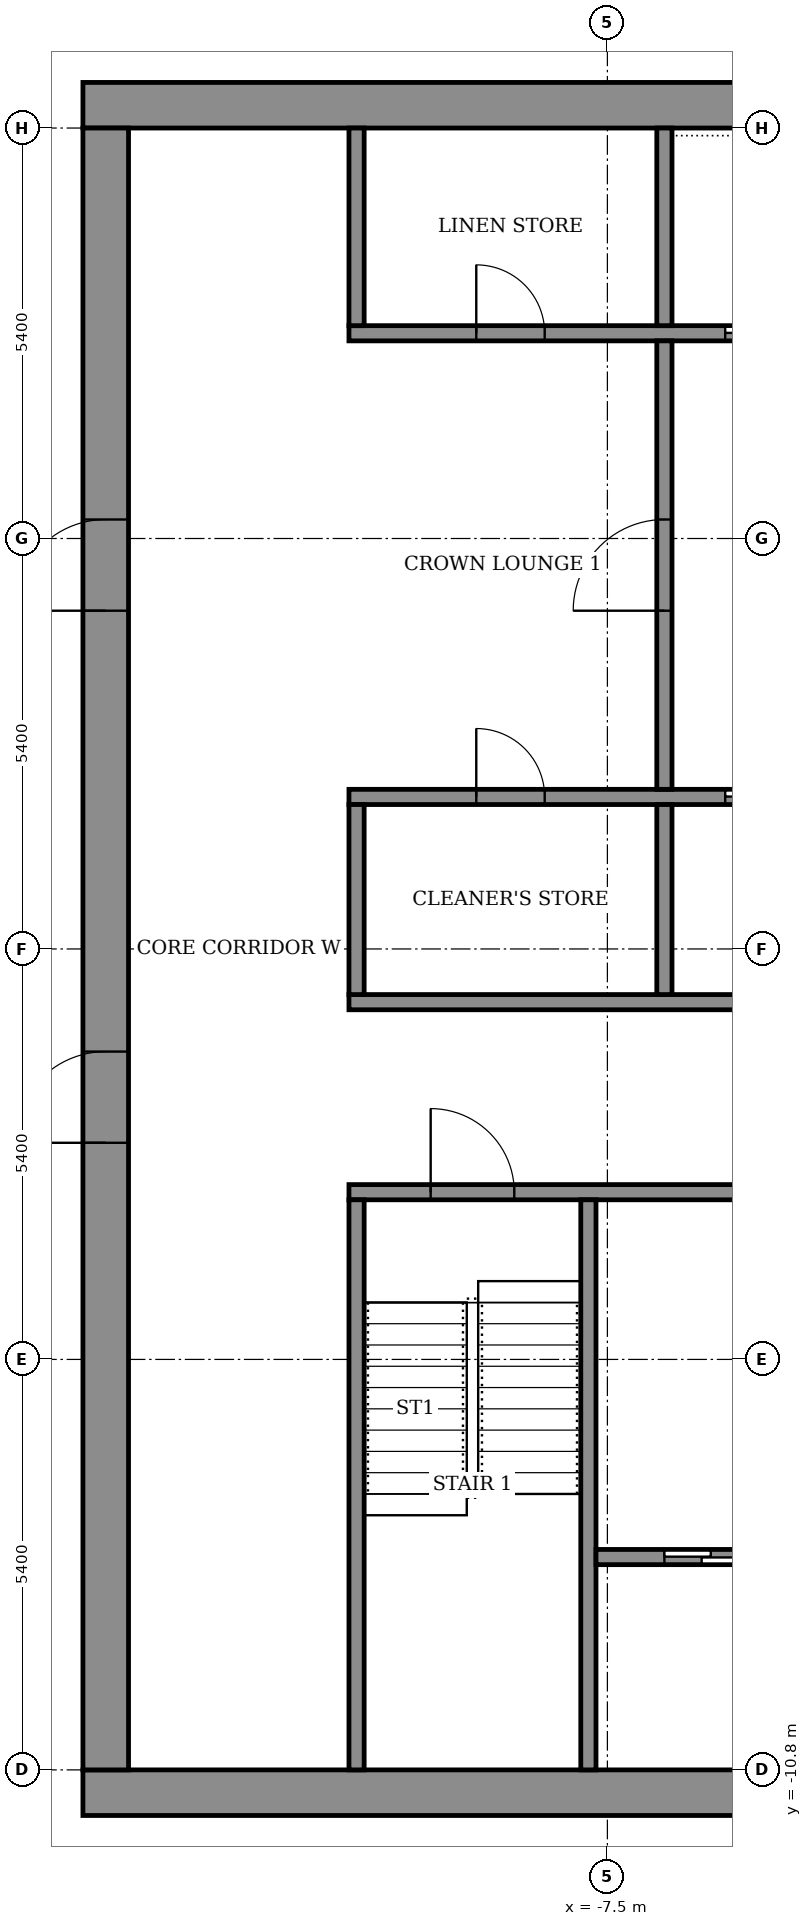
"""IFC4 building model, lengths in metres.
Left out: names, types, materials, properties, quantities, classifications, styles, units other than length and angle.
Written with IfcOpenShell. Run it as: python <this file> out.ifc"""

import sys

from ifc_helpers import new_model, si_unit, direction, frame, frame_2d, origin, place, context, subcontext, project, spatial, rectangle, extrude, element, fill, save


model = new_model("IFC4")
c1 = context("Model", 3, precision=1e-05, world=origin(), true_north=direction((0.0, 1.0)))
c2 = subcontext(c1, "Body", "Model", "MODEL_VIEW")
j1 = project(units=[si_unit("LENGTHUNIT", "METRE"), si_unit("PLANEANGLEUNIT", "RADIAN")], contexts=[c1])
p1 = place(None, origin())
s1 = spatial("IfcSite", under=j1, at=p1, CompositionType="ELEMENT")
p2 = place(p1, origin())
s2 = spatial("IfcBuilding", under=s1, at=p2, CompositionType="ELEMENT")
p3 = place(p2, frame((0.0, 0.0, 350.7)))
s3 = spatial("IfcBuildingStorey", under=s2, at=p3, CompositionType="ELEMENT", Elevation=350.7)
for number, where, z_axis, x_axis in (
    (1, (-14.4, -11.1, 0.0), (0.0, 0.0, 1.0), (1.0, 0.0, 0.0)),
    (2, (-14.4, 11.1, 0.0), (0.0, 0.0, 1.0), (1.0, 0.0, 0.0)),
):
    element("IfcWall", number, at=place(p3, frame(where, z_axis=z_axis, x_axis=x_axis)), inside=s3, PredefinedType="SHEAR", context=c2, shape_type="SweptSolid", body=[
        extrude(rectangle(XDim=28.8, YDim=0.6, at=frame_2d((14.4, 0.0))), origin(), (0.0, 0.0, 1.0), 3.6),
    ])
p4 = place(p3, frame((-14.1, -10.8, 0.0), z_axis=(0.0, 0.0, 1.0), x_axis=(0.0, 1.0, 0.0)))
e3 = element("IfcWall", 3, at=p4, inside=s3, PredefinedType="SHEAR", context=c2, shape_type="SweptSolid", body=[
    extrude(rectangle(XDim=21.6, YDim=0.6, at=frame_2d((10.8, 0.0))), origin(), (0.0, 0.0, 1.0), 3.6),
])
p5 = place(p4, frame((8.25, 0.0, 0.0)))
e4 = element("IfcOpeningElement", 4, at=p5, cuts=e3, PredefinedType="OPENING", context=c2, shape_type="SweptSolid", body=[
    extrude(rectangle(XDim=1.2, YDim=2.1, at=frame_2d((0.6, 1.05))), frame((0.0, 0.31, 0.0), z_axis=(0.0, -1.0, 0.0), x_axis=(1.0, 0.0, 0.0)), (0.0, 0.0, 1.0), 0.62),
])
p6 = place(p4, frame((15.25, 0.0, 0.0)))
e5 = element("IfcOpeningElement", 5, at=p6, cuts=e3, PredefinedType="OPENING", context=c2, shape_type="SweptSolid", body=[
    extrude(rectangle(XDim=1.2, YDim=2.1, at=frame_2d((0.6, 1.05))), frame((0.0, 0.31, 0.0), z_axis=(0.0, -1.0, 0.0), x_axis=(1.0, 0.0, 0.0)), (0.0, 0.0, 1.0), 0.62),
])
p7 = place(p3, frame((-10.9, -3.2, 0.0), z_axis=(0.0, 0.0, 1.0), x_axis=(1.0, 0.0, 0.0)))
e6 = element("IfcWall", 6, at=p7, inside=s3, PredefinedType="SHEAR", context=c2, shape_type="SweptSolid", body=[
    extrude(rectangle(XDim=21.8, YDim=0.2, at=frame_2d((10.9, 0.0))), origin(), (0.0, 0.0, 1.0), 3.05),
])
p8 = place(p7, frame((1.075, 0.0, 0.0)))
e7 = element("IfcOpeningElement", 7, at=p8, cuts=e6, PredefinedType="OPENING", context=c2, shape_type="SweptSolid", body=[
    extrude(rectangle(XDim=1.1, YDim=2.1, at=frame_2d((0.55, 1.05))), frame((0.0, 0.11, 0.0), z_axis=(0.0, -1.0, 0.0), x_axis=(1.0, 0.0, 0.0)), (0.0, 0.0, 1.0), 0.22),
])
p9 = place(p7, frame((10.325, 0.0, 0.0)))
e8 = element("IfcOpeningElement", 8, at=p9, cuts=e6, PredefinedType="OPENING", context=c2, shape_type="SweptSolid", body=[
    extrude(rectangle(XDim=1.1, YDim=2.1, at=frame_2d((0.55, 1.05))), frame((0.0, 0.11, 0.0), z_axis=(0.0, -1.0, 0.0), x_axis=(1.0, 0.0, 0.0)), (0.0, 0.0, 1.0), 0.22),
])
p10 = place(p7, frame((19.625, 0.0, 0.0)))
e9 = element("IfcOpeningElement", 9, at=p10, cuts=e6, PredefinedType="OPENING", context=c2, shape_type="SweptSolid", body=[
    extrude(rectangle(XDim=1.1, YDim=2.1, at=frame_2d((0.55, 1.05))), frame((0.0, 0.11, 0.0), z_axis=(0.0, -1.0, 0.0), x_axis=(1.0, 0.0, 0.0)), (0.0, 0.0, 1.0), 0.22),
])
p11 = place(p7, frame((5.7, 0.0, 0.0)))
e10 = element("IfcOpeningElement", 10, at=p11, cuts=e6, PredefinedType="OPENING", context=c2, shape_type="SweptSolid", body=[
    extrude(rectangle(XDim=1.1, YDim=2.1, at=frame_2d((0.55, 1.05))), frame((0.0, 0.11, 0.0), z_axis=(0.0, -1.0, 0.0), x_axis=(1.0, 0.0, 0.0)), (0.0, 0.0, 1.0), 0.22),
])
p12 = place(p7, frame((14.975, 0.0, 0.0)))
e11 = element("IfcOpeningElement", 11, at=p12, cuts=e6, PredefinedType="OPENING", context=c2, shape_type="SweptSolid", body=[
    extrude(rectangle(XDim=1.1, YDim=2.1, at=frame_2d((0.55, 1.05))), frame((0.0, 0.11, 0.0), z_axis=(0.0, -1.0, 0.0), x_axis=(1.0, 0.0, 0.0)), (0.0, 0.0, 1.0), 0.22),
])
p13 = place(p3, frame((-10.9, -0.7, 0.0), z_axis=(0.0, 0.0, 1.0), x_axis=(1.0, 0.0, 0.0)))
e12 = element("IfcWall", 12, at=p13, inside=s3, PredefinedType="SHEAR", context=c2, shape_type="SweptSolid", body=[
    extrude(rectangle(XDim=21.8, YDim=0.2, at=frame_2d((10.9, 0.0))), origin(), (0.0, 0.0, 1.0), 3.05),
])
p14 = place(p3, frame((-10.9, 2.0, 0.0), z_axis=(0.0, 0.0, 1.0), x_axis=(1.0, 0.0, 0.0)))
e13 = element("IfcWall", 13, at=p14, inside=s3, PredefinedType="SHEAR", context=c2, shape_type="SweptSolid", body=[
    extrude(rectangle(XDim=21.8, YDim=0.2, at=frame_2d((10.9, 0.0))), origin(), (0.0, 0.0, 1.0), 3.05),
])
p15 = place(p14, frame((4.95, 0.0, 0.0)))
e14 = element("IfcOpeningElement", 14, at=p15, cuts=e13, PredefinedType="OPENING", context=c2, shape_type="SweptSolid", body=[
    extrude(rectangle(XDim=1.1, YDim=2.1, at=frame_2d((0.55, 1.05))), frame((0.0, 0.11, 0.0), z_axis=(0.0, -1.0, 0.0), x_axis=(1.0, 0.0, 0.0)), (0.0, 0.0, 1.0), 0.22),
])
p16 = place(p14, frame((7.65, 0.0, 0.0)))
e15 = element("IfcOpeningElement", 15, at=p16, cuts=e13, PredefinedType="OPENING", context=c2, shape_type="SweptSolid", body=[
    extrude(rectangle(XDim=1.1, YDim=2.1, at=frame_2d((0.55, 1.05))), frame((0.0, 0.11, 0.0), z_axis=(0.0, -1.0, 0.0), x_axis=(1.0, 0.0, 0.0)), (0.0, 0.0, 1.0), 0.22),
])
p17 = place(p14, frame((10.35, 0.0, 0.0)))
e16 = element("IfcOpeningElement", 16, at=p17, cuts=e13, PredefinedType="OPENING", context=c2, shape_type="SweptSolid", body=[
    extrude(rectangle(XDim=1.1, YDim=2.1, at=frame_2d((0.55, 1.05))), frame((0.0, 0.11, 0.0), z_axis=(0.0, -1.0, 0.0), x_axis=(1.0, 0.0, 0.0)), (0.0, 0.0, 1.0), 0.22),
])
p18 = place(p14, frame((1.675, 0.0, 0.0)))
e17 = element("IfcOpeningElement", 17, at=p18, cuts=e13, PredefinedType="OPENING", context=c2, shape_type="SweptSolid", body=[
    extrude(rectangle(XDim=0.9, YDim=2.1, at=frame_2d((0.45, 1.05))), frame((0.0, 0.11, 0.0), z_axis=(0.0, -1.0, 0.0), x_axis=(1.0, 0.0, 0.0)), (0.0, 0.0, 1.0), 0.22),
])
p19 = place(p14, frame((14.5, 0.0, 0.0)))
e18 = element("IfcOpeningElement", 18, at=p19, cuts=e13, PredefinedType="OPENING", context=c2, shape_type="SweptSolid", body=[
    extrude(rectangle(XDim=0.9, YDim=2.1, at=frame_2d((0.45, 1.05))), frame((0.0, 0.11, 0.0), z_axis=(0.0, -1.0, 0.0), x_axis=(1.0, 0.0, 0.0)), (0.0, 0.0, 1.0), 0.22),
])
p20 = place(p14, frame((19.225, 0.0, 0.0)))
e19 = element("IfcOpeningElement", 19, at=p20, cuts=e13, PredefinedType="OPENING", context=c2, shape_type="SweptSolid", body=[
    extrude(rectangle(XDim=0.9, YDim=2.1, at=frame_2d((0.45, 1.05))), frame((0.0, 0.11, 0.0), z_axis=(0.0, -1.0, 0.0), x_axis=(1.0, 0.0, 0.0)), (0.0, 0.0, 1.0), 0.22),
])
p21 = place(p3, frame((-10.9, 8.1, 0.0), z_axis=(0.0, 0.0, 1.0), x_axis=(1.0, 0.0, 0.0)))
e20 = element("IfcWall", 20, at=p21, inside=s3, PredefinedType="SHEAR", context=c2, shape_type="SweptSolid", body=[
    extrude(rectangle(XDim=21.8, YDim=0.2, at=frame_2d((10.9, 0.0))), origin(), (0.0, 0.0, 1.0), 3.05),
])
p22 = place(p21, frame((4.95, 0.0, 0.0)))
e21 = element("IfcOpeningElement", 21, at=p22, cuts=e20, PredefinedType="OPENING", context=c2, shape_type="SweptSolid", body=[
    extrude(rectangle(XDim=1.1, YDim=2.1, at=frame_2d((0.55, 1.05))), frame((0.0, 0.11, 0.0), z_axis=(0.0, -1.0, 0.0), x_axis=(1.0, 0.0, 0.0)), (0.0, 0.0, 1.0), 0.22),
])
p23 = place(p21, frame((7.65, 0.0, 0.0)))
e22 = element("IfcOpeningElement", 22, at=p23, cuts=e20, PredefinedType="OPENING", context=c2, shape_type="SweptSolid", body=[
    extrude(rectangle(XDim=1.1, YDim=2.1, at=frame_2d((0.55, 1.05))), frame((0.0, 0.11, 0.0), z_axis=(0.0, -1.0, 0.0), x_axis=(1.0, 0.0, 0.0)), (0.0, 0.0, 1.0), 0.22),
])
p24 = place(p21, frame((10.35, 0.0, 0.0)))
e23 = element("IfcOpeningElement", 23, at=p24, cuts=e20, PredefinedType="OPENING", context=c2, shape_type="SweptSolid", body=[
    extrude(rectangle(XDim=1.1, YDim=2.1, at=frame_2d((0.55, 1.05))), frame((0.0, 0.11, 0.0), z_axis=(0.0, -1.0, 0.0), x_axis=(1.0, 0.0, 0.0)), (0.0, 0.0, 1.0), 0.22),
])
p25 = place(p21, frame((1.675, 0.0, 0.0)))
e24 = element("IfcOpeningElement", 24, at=p25, cuts=e20, PredefinedType="OPENING", context=c2, shape_type="SweptSolid", body=[
    extrude(rectangle(XDim=0.9, YDim=2.1, at=frame_2d((0.45, 1.05))), frame((0.0, 0.11, 0.0), z_axis=(0.0, -1.0, 0.0), x_axis=(1.0, 0.0, 0.0)), (0.0, 0.0, 1.0), 0.22),
])
p26 = place(p21, frame((14.5, 0.0, 0.0)))
e25 = element("IfcOpeningElement", 25, at=p26, cuts=e20, PredefinedType="OPENING", context=c2, shape_type="SweptSolid", body=[
    extrude(rectangle(XDim=0.9, YDim=2.1, at=frame_2d((0.45, 1.05))), frame((0.0, 0.11, 0.0), z_axis=(0.0, -1.0, 0.0), x_axis=(1.0, 0.0, 0.0)), (0.0, 0.0, 1.0), 0.22),
])
p27 = place(p21, frame((19.225, 0.0, 0.0)))
e26 = element("IfcOpeningElement", 26, at=p27, cuts=e20, PredefinedType="OPENING", context=c2, shape_type="SweptSolid", body=[
    extrude(rectangle(XDim=0.9, YDim=2.1, at=frame_2d((0.45, 1.05))), frame((0.0, 0.11, 0.0), z_axis=(0.0, -1.0, 0.0), x_axis=(1.0, 0.0, 0.0)), (0.0, 0.0, 1.0), 0.22),
])
for number, where, z_axis, x_axis in (
    (27, (-10.8, -10.8, 0.0), (0.0, 0.0, 1.0), (0.0, 1.0, 0.0)),
    (28, (-7.75, -10.8, 0.0), (0.0, 0.0, 1.0), (0.0, 1.0, 0.0)),
):
    element("IfcWall", number, at=place(p3, frame(where, z_axis=z_axis, x_axis=x_axis)), inside=s3, PredefinedType="SHEAR", context=c2, shape_type="SweptSolid", body=[
        extrude(rectangle(XDim=7.5, YDim=0.2, at=frame_2d((3.75, 0.0))), origin(), (0.0, 0.0, 1.0), 3.05),
    ])
p28 = place(p3, frame((-7.65, -8.0, 0.0), z_axis=(0.0, 0.0, 1.0), x_axis=(1.0, 0.0, 0.0)))
e29 = element("IfcWall", 29, at=p28, inside=s3, PredefinedType="SHEAR", context=c2, shape_type="SweptSolid", body=[
    extrude(rectangle(XDim=6.0, YDim=0.2, at=frame_2d((3.0, 0.0))), origin(), (0.0, 0.0, 1.0), 3.05),
])
p29 = place(p28, frame((0.9, 0.0, 0.0)))
e30 = element("IfcOpeningElement", 30, at=p29, cuts=e29, PredefinedType="OPENING", context=c2, shape_type="SweptSolid", body=[
    extrude(rectangle(XDim=1.1, YDim=2.1, at=frame_2d((0.55, 1.05))), frame((0.0, 0.11, 0.0), z_axis=(0.0, -1.0, 0.0), x_axis=(1.0, 0.0, 0.0)), (0.0, 0.0, 1.0), 0.22),
])
p30 = place(p28, frame((4.0, 0.0, 0.0)))
e31 = element("IfcOpeningElement", 31, at=p30, cuts=e29, PredefinedType="OPENING", context=c2, shape_type="SweptSolid", body=[
    extrude(rectangle(XDim=1.1, YDim=2.1, at=frame_2d((0.55, 1.05))), frame((0.0, 0.11, 0.0), z_axis=(0.0, -1.0, 0.0), x_axis=(1.0, 0.0, 0.0)), (0.0, 0.0, 1.0), 0.22),
])
p31 = place(p3, frame((-10.8, -0.6, 0.0), z_axis=(0.0, 0.0, 1.0), x_axis=(0.0, 1.0, 0.0)))
e32 = element("IfcWall", 32, at=p31, inside=s3, PredefinedType="STANDARD", context=c2, shape_type="SweptSolid", body=[
    extrude(rectangle(XDim=2.5, YDim=0.2, at=frame_2d((1.25, 0.0))), origin(), (0.0, 0.0, 1.0), 3.05),
])
p32 = place(p3, frame((-6.75, -0.6, 0.0), z_axis=(0.0, 0.0, 1.0), x_axis=(0.0, 1.0, 0.0)))
e33 = element("IfcWall", 33, at=p32, inside=s3, PredefinedType="SHEAR", context=c2, shape_type="SweptSolid", body=[
    extrude(rectangle(XDim=2.5, YDim=0.2, at=frame_2d((1.25, 0.0))), origin(), (0.0, 0.0, 1.0), 3.05),
])
p33 = place(p3, frame((-10.8, 8.2, 0.0), z_axis=(0.0, 0.0, 1.0), x_axis=(0.0, 1.0, 0.0)))
e34 = element("IfcWall", 34, at=p33, inside=s3, PredefinedType="STANDARD", context=c2, shape_type="SweptSolid", body=[
    extrude(rectangle(XDim=2.6, YDim=0.2, at=frame_2d((1.3, 0.0))), origin(), (0.0, 0.0, 1.0), 3.05),
])
p34 = place(p3, frame((-6.75, 8.2, 0.0), z_axis=(0.0, 0.0, 1.0), x_axis=(0.0, 1.0, 0.0)))
e35 = element("IfcWall", 35, at=p34, inside=s3, PredefinedType="SHEAR", context=c2, shape_type="SweptSolid", body=[
    extrude(rectangle(XDim=2.6, YDim=0.2, at=frame_2d((1.3, 0.0))), origin(), (0.0, 0.0, 1.0), 3.05),
])
p35 = place(p3, frame((-6.75, 2.1, 0.0), z_axis=(0.0, 0.0, 1.0), x_axis=(0.0, 1.0, 0.0)))
e36 = element("IfcWall", 36, at=p35, inside=s3, PredefinedType="STANDARD", context=c2, shape_type="SweptSolid", body=[
    extrude(rectangle(XDim=5.9, YDim=0.2, at=frame_2d((2.95, 0.0))), origin(), (0.0, 0.0, 1.0), 3.05),
])
p36 = place(p35, frame((2.35, 0.0, 0.0)))
e37 = element("IfcOpeningElement", 37, at=p36, cuts=e36, PredefinedType="OPENING", context=c2, shape_type="SweptSolid", body=[
    extrude(rectangle(XDim=1.2, YDim=2.1, at=frame_2d((0.6, 1.05))), frame((0.0, 0.11, 0.0), z_axis=(0.0, -1.0, 0.0), x_axis=(1.0, 0.0, 0.0)), (0.0, 0.0, 1.0), 0.22),
])
p37 = place(p5, origin())
e38 = element("IfcDoor", 38, at=p37, inside=s3, OperationType="DOUBLE_DOOR_SINGLE_SWING", PredefinedType="DOOR", context=c2, shape_type="SweptSolid", body=[
    extrude(rectangle(XDim=1.2, YDim=2.1, at=frame_2d((0.6, 1.05))), frame((0.0, 0.025, 0.0), z_axis=(0.0, -1.0, 0.0), x_axis=(1.0, 0.0, 0.0)), (0.0, 0.0, 1.0), 0.05),
])
fill(e4, e38)
p38 = place(p6, origin())
e39 = element("IfcDoor", 39, at=p38, inside=s3, OperationType="DOUBLE_DOOR_SINGLE_SWING", PredefinedType="DOOR", context=c2, shape_type="SweptSolid", body=[
    extrude(rectangle(XDim=1.2, YDim=2.1, at=frame_2d((0.6, 1.05))), frame((0.0, 0.025, 0.0), z_axis=(0.0, -1.0, 0.0), x_axis=(1.0, 0.0, 0.0)), (0.0, 0.0, 1.0), 0.05),
])
fill(e5, e39)
p39 = place(p15, origin())
e40 = element("IfcDoor", 40, at=p39, inside=s3, OperationType="SLIDING_TO_LEFT", PredefinedType="DOOR", context=c2, shape_type="SweptSolid", body=[
    extrude(rectangle(XDim=1.1, YDim=2.1, at=frame_2d((0.55, 1.05))), frame((0.0, 0.025, 0.0), z_axis=(0.0, -1.0, 0.0), x_axis=(1.0, 0.0, 0.0)), (0.0, 0.0, 1.0), 0.05),
])
fill(e14, e40)
p40 = place(p22, origin())
e41 = element("IfcDoor", 41, at=p40, inside=s3, OperationType="SLIDING_TO_LEFT", PredefinedType="DOOR", context=c2, shape_type="SweptSolid", body=[
    extrude(rectangle(XDim=1.1, YDim=2.1, at=frame_2d((0.55, 1.05))), frame((0.0, 0.025, 0.0), z_axis=(0.0, -1.0, 0.0), x_axis=(1.0, 0.0, 0.0)), (0.0, 0.0, 1.0), 0.05),
])
fill(e21, e41)
p41 = place(p18, origin())
e42 = element("IfcDoor", 42, at=p41, inside=s3, OperationType="SINGLE_SWING_RIGHT", PredefinedType="DOOR", context=c2, shape_type="SweptSolid", body=[
    extrude(rectangle(XDim=0.9, YDim=2.1, at=frame_2d((0.45, 1.05))), frame((0.0, 0.025, 0.0), z_axis=(0.0, -1.0, 0.0), x_axis=(1.0, 0.0, 0.0)), (0.0, 0.0, 1.0), 0.05),
])
fill(e17, e42)
p42 = place(p25, origin())
e43 = element("IfcDoor", 43, at=p42, inside=s3, OperationType="SINGLE_SWING_RIGHT", PredefinedType="DOOR", context=c2, shape_type="SweptSolid", body=[
    extrude(rectangle(XDim=0.9, YDim=2.1, at=frame_2d((0.45, 1.05))), frame((0.0, 0.025, 0.0), z_axis=(0.0, -1.0, 0.0), x_axis=(1.0, 0.0, 0.0)), (0.0, 0.0, 1.0), 0.05),
])
fill(e24, e43)
p43 = place(p29, origin())
e44 = element("IfcDoor", 44, at=p43, inside=s3, OperationType="SLIDING_TO_LEFT", PredefinedType="DOOR", context=c2, shape_type="SweptSolid", body=[
    extrude(rectangle(XDim=1.1, YDim=2.1, at=frame_2d((0.55, 1.05))), frame((0.0, 0.025, 0.0), z_axis=(0.0, -1.0, 0.0), x_axis=(1.0, 0.0, 0.0)), (0.0, 0.0, 1.0), 0.05),
])
fill(e30, e44)
p44 = place(p8, origin())
e45 = element("IfcDoor", 45, at=p44, inside=s3, OperationType="SINGLE_SWING_RIGHT", PredefinedType="DOOR", context=c2, shape_type="SweptSolid", body=[
    extrude(rectangle(XDim=1.1, YDim=2.1, at=frame_2d((0.55, 1.05))), frame((0.0, 0.025, 0.0), z_axis=(0.0, -1.0, 0.0), x_axis=(1.0, 0.0, 0.0)), (0.0, 0.0, 1.0), 0.05),
])
fill(e7, e45)
p45 = place(p36, origin())
e46 = element("IfcDoor", 46, at=p45, inside=s3, OperationType="SINGLE_SWING_LEFT", PredefinedType="DOOR", context=c2, shape_type="SweptSolid", body=[
    extrude(rectangle(XDim=1.2, YDim=2.1, at=frame_2d((0.6, 1.05))), frame((0.0, 0.025, 0.0), z_axis=(0.0, -1.0, 0.0), x_axis=(1.0, 0.0, 0.0)), (0.0, 0.0, 1.0), 0.05),
])
fill(e37, e46)
save(model, sys.argv[1])
